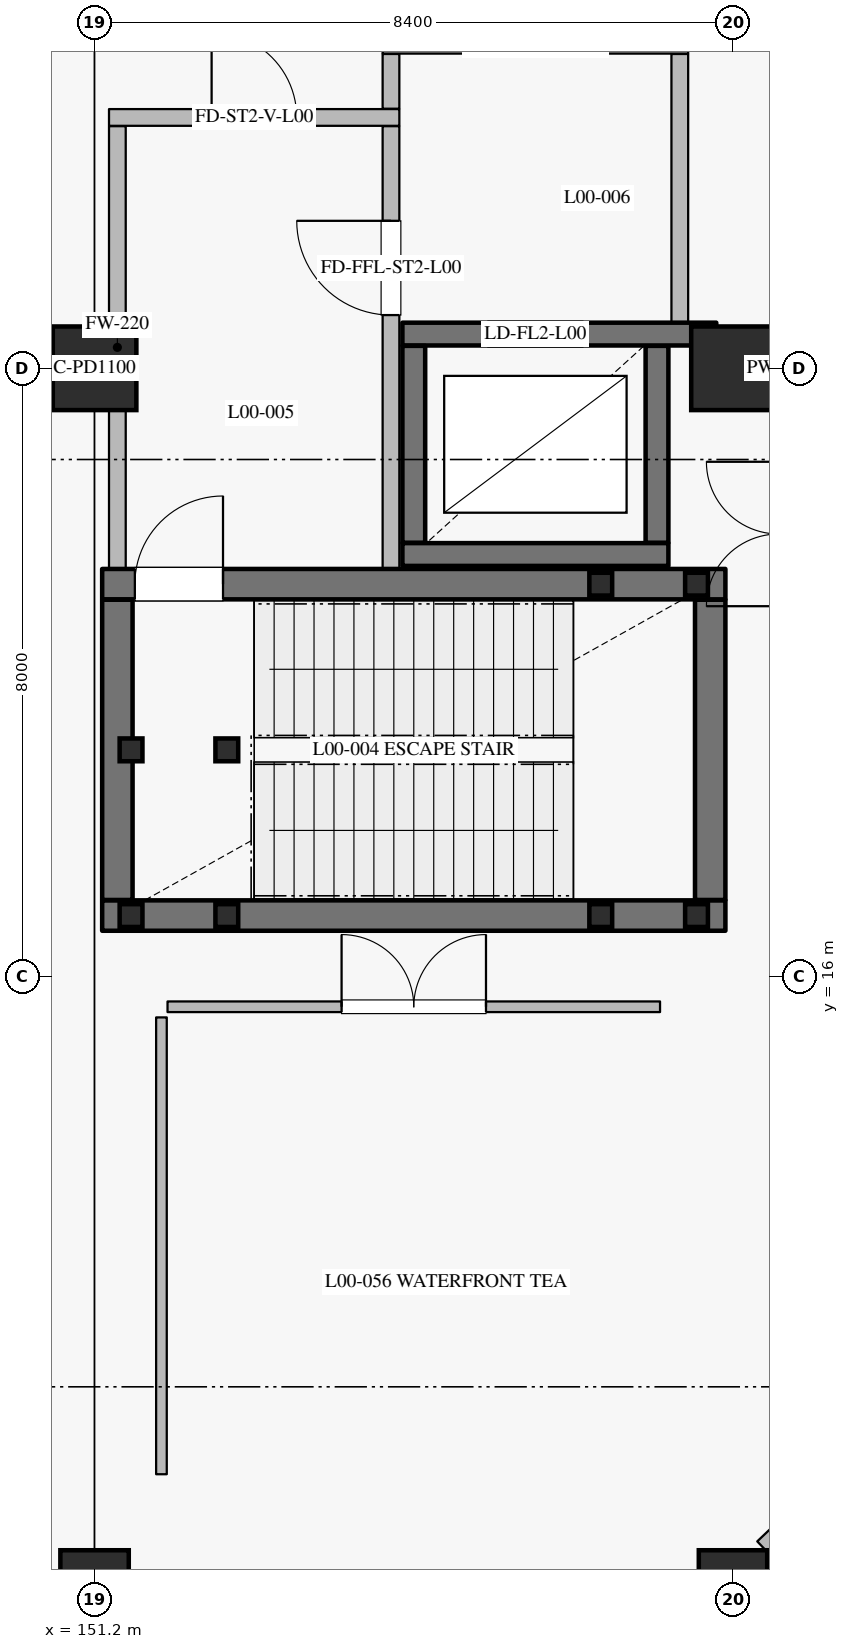
"""IFC4 building model, lengths in metres.
Left out: names, types, materials, properties, quantities, classifications, styles, units other than length and angle.
Written with IfcOpenShell. Run it as: python <this file> out.ifc"""

import sys

from ifc_helpers import new_model, si_unit, direction, frame, frame_2d, origin, origin_2d, place, context, subcontext, project, spatial, rectangle, hollow_rectangle, circle, extrude, element, fill, save


model = new_model("IFC4")
c1 = context("Model", 3, precision=1e-05, world=origin(), true_north=direction((0.0, 1.0)))
c2 = subcontext(c1, "Body", "Model", "MODEL_VIEW")
j1 = project(units=[si_unit("LENGTHUNIT", "METRE"), si_unit("PLANEANGLEUNIT", "RADIAN")], contexts=[c1])
p1 = place(None, origin())
s1 = spatial("IfcSite", under=j1, at=p1, CompositionType="ELEMENT")
p2 = place(p1, origin())
s2 = spatial("IfcBuilding", under=s1, at=p2, CompositionType="ELEMENT")
p3 = place(p2, origin())
s3 = spatial("IfcBuildingStorey", under=s2, at=p3, CompositionType="ELEMENT", Elevation=0.0)
p4 = place(p3, frame((151.2, 8.0, 0.0), z_axis=(0.0, 0.0, 1.0), x_axis=(1.0, 0.0, 0.0)))
e1 = element("IfcColumn", 1, at=p4, inside=s3, PredefinedType="COLUMN", context=c2, shape_type="SweptSolid", body=[
    extrude(circle(Radius=0.45, at=origin_2d()), origin(), (0.0, 0.0, 1.0), 6.0),
])
p5 = place(p3, frame((151.2, 24.0, 0.0), z_axis=(0.0, 0.0, 1.0), x_axis=(1.0, 0.0, 0.0)))
e2 = element("IfcColumn", 2, at=p5, inside=s3, PredefinedType="COLUMN", context=c2, shape_type="SweptSolid", body=[
    extrude(circle(Radius=0.55, at=origin_2d()), origin(), (0.0, 0.0, 1.0), 6.0),
])
p6 = place(p3, frame((159.6, 8.0, 0.0), z_axis=(0.0, 0.0, 1.0), x_axis=(1.0, 0.0, 0.0)))
e3 = element("IfcColumn", 3, at=p6, inside=s3, PredefinedType="COLUMN", context=c2, shape_type="SweptSolid", body=[
    extrude(circle(Radius=0.45, at=origin_2d()), origin(), (0.0, 0.0, 1.0), 6.0),
])
p7 = place(p3, frame((159.6, 24.0, 0.0), z_axis=(0.0, 0.0, 1.0), x_axis=(1.0, 0.0, 0.0)))
e4 = element("IfcColumn", 4, at=p7, inside=s3, PredefinedType="COLUMN", context=c2, shape_type="SweptSolid", body=[
    extrude(circle(Radius=0.55, at=origin_2d()), origin(), (0.0, 0.0, 1.0), 6.0),
])
p8 = place(p3, frame((167.55, 15.571, 0.0), z_axis=(0.0, 0.0, 1.0), x_axis=(-0.724174929863, -0.689616321557, 0.0)))
e5 = element("IfcWall", 5, at=p8, inside=s3, PredefinedType="SOLIDWALL", context=c2, shape_type="SweptSolid", body=[
    extrude(rectangle(XDim=10.357, YDim=0.38, at=frame_2d((5.178, 0.0))), origin(), (0.0, 0.0, 1.0), 5.0),
])
p9 = place(p8, frame((3.978, 0.0, 0.0)))
e6 = element("IfcOpeningElement", 6, at=p9, cuts=e5, PredefinedType="OPENING", context=c2, shape_type="SweptSolid", body=[
    extrude(rectangle(XDim=2.4, YDim=2.6, at=frame_2d((1.2, 1.3))), frame((0.0, 0.2, 0.0), z_axis=(0.0, -1.0, 0.0), x_axis=(1.0, 0.0, 0.0)), (0.0, 0.0, 1.0), 0.4),
])
p10 = place(p3, frame((155.25, 21.55, 0.0), z_axis=(0.0, 0.0, 1.0), x_axis=(1.0, 0.0, 0.0)))
e7 = element("IfcWall", 7, at=p10, inside=s3, PredefinedType="SHEAR", context=c2, shape_type="SweptSolid", body=[
    extrude(rectangle(XDim=3.5, YDim=0.3, at=frame_2d((1.75, 0.0))), origin(), (0.0, 0.0, 1.0), 5.675),
])
p11 = place(p3, frame((158.6, 21.705, 0.0), z_axis=(0.0, 0.0, 1.0), x_axis=(0.0, 1.0, 0.0)))
e8 = element("IfcWall", 8, at=p11, inside=s3, PredefinedType="SHEAR", context=c2, shape_type="SweptSolid", body=[
    extrude(rectangle(XDim=2.59, YDim=0.3, at=frame_2d((1.295, 0.0))), origin(), (0.0, 0.0, 1.0), 5.675),
])
p12 = place(p3, frame((159.38, 24.45, 0.0), z_axis=(0.0, 0.0, 1.0), x_axis=(-1.0, 0.0, 0.0)))
e9 = element("IfcWall", 9, at=p12, inside=s3, PredefinedType="SHEAR", context=c2, shape_type="SweptSolid", body=[
    extrude(rectangle(XDim=4.13, YDim=0.3, at=frame_2d((2.065, 0.0))), origin(), (0.0, 0.0, 1.0), 5.675),
])
p13 = place(p12, frame((1.755, 0.0, 0.0)))
e10 = element("IfcOpeningElement", 10, at=p13, cuts=e9, PredefinedType="OPENING", context=c2, shape_type="SweptSolid", body=[
    extrude(rectangle(XDim=1.25, YDim=2.25, at=frame_2d((0.625, 1.125))), frame((0.0, 0.16, 0.0), z_axis=(0.0, -1.0, 0.0), x_axis=(1.0, 0.0, 0.0)), (0.0, 0.0, 1.0), 0.32),
])
p14 = place(p3, frame((155.4, 24.295, 0.0), z_axis=(0.0, 0.0, 1.0), x_axis=(0.0, -1.0, 0.0)))
e11 = element("IfcWall", 11, at=p14, inside=s3, PredefinedType="SHEAR", context=c2, shape_type="SweptSolid", body=[
    extrude(rectangle(XDim=2.59, YDim=0.3, at=frame_2d((1.295, 0.0))), origin(), (0.0, 0.0, 1.0), 5.675),
])
p15 = place(p3, frame((151.3, 16.8, 0.0), z_axis=(0.0, 0.0, 1.0), x_axis=(1.0, 0.0, 0.0)))
e12 = element("IfcWall", 12, at=p15, inside=s3, PredefinedType="SHEAR", context=c2, shape_type="SweptSolid", body=[
    extrude(rectangle(XDim=8.2, YDim=0.4, at=frame_2d((4.1, 0.0))), origin(), (0.0, 0.0, 1.0), 5.675),
])
p16 = place(p3, frame((159.3, 17.005, 0.0), z_axis=(0.0, 0.0, 1.0), x_axis=(0.0, 1.0, 0.0)))
e13 = element("IfcWall", 13, at=p16, inside=s3, PredefinedType="SHEAR", context=c2, shape_type="SweptSolid", body=[
    extrude(rectangle(XDim=3.95, YDim=0.4, at=frame_2d((1.975, 0.0))), origin(), (0.0, 0.0, 1.0), 5.675),
])
p17 = place(p3, frame((151.3, 21.16, 0.0), z_axis=(0.0, 0.0, 1.0), x_axis=(1.0, 0.0, 0.0)))
e14 = element("IfcWall", 14, at=p17, inside=s3, PredefinedType="SHEAR", context=c2, shape_type="SweptSolid", body=[
    extrude(rectangle(XDim=8.2, YDim=0.4, at=frame_2d((4.1, 0.0))), origin(), (0.0, 0.0, 1.0), 5.675),
])
p18 = place(p17, frame((0.43, 0.0, 0.0)))
e15 = element("IfcOpeningElement", 15, at=p18, cuts=e14, PredefinedType="OPENING", context=c2, shape_type="SweptSolid", body=[
    extrude(rectangle(XDim=1.16, YDim=2.2, at=frame_2d((0.58, 1.1))), frame((0.0, 0.21, 0.0), z_axis=(0.0, -1.0, 0.0), x_axis=(1.0, 0.0, 0.0)), (0.0, 0.0, 1.0), 0.42),
])
p19 = place(p3, frame((151.5, 17.005, 0.0), z_axis=(0.0, 0.0, 1.0), x_axis=(0.0, 1.0, 0.0)))
e16 = element("IfcWall", 16, at=p19, inside=s3, PredefinedType="SHEAR", context=c2, shape_type="SweptSolid", body=[
    extrude(rectangle(XDim=3.95, YDim=0.4, at=frame_2d((1.975, 0.0))), origin(), (0.0, 0.0, 1.0), 5.675),
])
p20 = place(p3, frame((151.5, 21.365, 0.0), z_axis=(0.0, 0.0, 1.0), x_axis=(0.0, 1.0, 0.0)))
e17 = element("IfcWall", 17, at=p20, inside=s3, PredefinedType="PARTITIONING", context=c2, shape_type="SweptSolid", body=[
    extrude(rectangle(XDim=5.82, YDim=0.22, at=frame_2d((2.91, 0.0))), origin(), (0.0, 0.0, 1.0), 4.75),
])
p21 = place(p3, frame((151.39, 27.3, 0.0), z_axis=(0.0, 0.0, 1.0), x_axis=(1.0, 0.0, 0.0)))
e18 = element("IfcWall", 18, at=p21, inside=s3, PredefinedType="PARTITIONING", context=c2, shape_type="SweptSolid", body=[
    extrude(rectangle(XDim=3.82, YDim=0.22, at=frame_2d((1.91, 0.0))), origin(), (0.0, 0.0, 1.0), 5.675),
])
p22 = place(p21, frame((1.35, 0.0, 0.0)))
e19 = element("IfcOpeningElement", 19, at=p22, cuts=e18, PredefinedType="OPENING", context=c2, shape_type="SweptSolid", body=[
    extrude(rectangle(XDim=1.12, YDim=2.2, at=frame_2d((0.56, 1.1))), frame((0.0, 0.12, 0.0), z_axis=(0.0, -1.0, 0.0), x_axis=(1.0, 0.0, 0.0)), (0.0, 0.0, 1.0), 0.24),
])
p23 = place(p3, frame((155.1, 21.365, 0.0), z_axis=(0.0, 0.0, 1.0), x_axis=(0.0, 1.0, 0.0)))
e20 = element("IfcWall", 20, at=p23, inside=s3, PredefinedType="PARTITIONING", context=c2, shape_type="SweptSolid", body=[
    extrude(rectangle(XDim=5.82, YDim=0.22, at=frame_2d((2.91, 0.0))), origin(), (0.0, 0.0, 1.0), 5.675),
])
p24 = place(p23, frame((3.335, 0.0, 0.0)))
e21 = element("IfcOpeningElement", 21, at=p24, cuts=e20, PredefinedType="OPENING", context=c2, shape_type="SweptSolid", body=[
    extrude(rectangle(XDim=1.24, YDim=2.2, at=frame_2d((0.62, 1.1))), frame((0.0, 0.12, 0.0), z_axis=(0.0, -1.0, 0.0), x_axis=(1.0, 0.0, 0.0)), (0.0, 0.0, 1.0), 0.24),
])
p25 = place(p3, frame((155.1, 27.415, 0.0), z_axis=(0.0, 0.0, 1.0), x_axis=(0.0, 1.0, 0.0)))
e22 = element("IfcWall", 22, at=p25, inside=s3, PredefinedType="PARTITIONING", context=c2, shape_type="SweptSolid", body=[
    extrude(rectangle(XDim=0.72, YDim=0.22, at=frame_2d((0.36, 0.0))), origin(), (0.0, 0.0, 1.0), 5.675),
])
p26 = place(p3, frame((158.9, 24.605, 0.0), z_axis=(0.0, 0.0, 1.0), x_axis=(0.0, 1.0, 0.0)))
e23 = element("IfcWall", 23, at=p26, inside=s3, PredefinedType="PARTITIONING", context=c2, shape_type="SweptSolid", body=[
    extrude(rectangle(XDim=3.53, YDim=0.22, at=frame_2d((1.765, 0.0))), origin(), (0.0, 0.0, 1.0), 5.675),
])
p27 = place(p3, frame((154.99, 28.25, 0.0), z_axis=(0.0, 0.0, 1.0), x_axis=(1.0, 0.0, 0.0)))
e24 = element("IfcWall", 24, at=p27, inside=s3, PredefinedType="PARTITIONING", context=c2, shape_type="SweptSolid", body=[
    extrude(rectangle(XDim=4.02, YDim=0.22, at=frame_2d((2.01, 0.0))), origin(), (0.0, 0.0, 1.0), 5.675),
])
p28 = place(p27, frame((1.39, 0.0, 0.0)))
e25 = element("IfcOpeningElement", 25, at=p28, cuts=e24, PredefinedType="OPENING", context=c2, shape_type="SweptSolid", body=[
    extrude(rectangle(XDim=1.24, YDim=2.2, at=frame_2d((0.62, 1.1))), frame((0.0, 0.12, 0.0), z_axis=(0.0, -1.0, 0.0), x_axis=(1.0, 0.0, 0.0)), (0.0, 0.0, 1.0), 0.24),
])
for number, where, z_axis, x_axis in (
    (26, (151.68, 16.8, 0.0), (0.0, 0.0, 1.0), (1.0, 0.0, 0.0)),
    (27, (151.68, 18.98, 0.0), (0.0, 0.0, 1.0), (1.0, 0.0, 0.0)),
    (28, (152.94, 16.8, 0.0), (0.0, 0.0, 1.0), (1.0, 0.0, 0.0)),
    (29, (152.94, 18.98, 0.0), (0.0, 0.0, 1.0), (1.0, 0.0, 0.0)),
):
    element("IfcColumn", number, at=place(p3, frame(where, z_axis=z_axis, x_axis=x_axis)), inside=s3, PredefinedType="COLUMN", context=c2, shape_type="SweptSolid", body=[
        extrude(hollow_rectangle(XDim=0.3, YDim=0.3, WallThickness=0.012, at=origin_2d()), origin(), (0.0, 0.0, 1.0), 5.82),
    ])
for number, where, z_axis, x_axis in (
    (30, (157.86, 16.8, -2.7), (0.0, 0.0, 1.0), (1.0, 0.0, 0.0)),
    (31, (157.86, 21.16, -2.7), (0.0, 0.0, 1.0), (1.0, 0.0, 0.0)),
    (32, (159.12, 16.8, -2.7), (0.0, 0.0, 1.0), (1.0, 0.0, 0.0)),
    (33, (159.12, 21.16, -2.7), (0.0, 0.0, 1.0), (1.0, 0.0, 0.0)),
):
    element("IfcColumn", number, at=place(p3, frame(where, z_axis=z_axis, x_axis=x_axis)), inside=s3, PredefinedType="COLUMN", context=c2, shape_type="SweptSolid", body=[
        extrude(hollow_rectangle(XDim=0.3, YDim=0.3, WallThickness=0.012, at=origin_2d()), origin(), (0.0, 0.0, 1.0), 5.52),
    ])
p29 = place(p3, frame((152.16, 15.6, 0.0), z_axis=(0.0, 0.0, 1.0), x_axis=(1.0, 0.0, 0.0)))
e34 = element("IfcWall", 34, at=p29, inside=s3, PredefinedType="PARTITIONING", context=c2, shape_type="SweptSolid", body=[
    extrude(rectangle(XDim=6.48, YDim=0.14, at=frame_2d((3.24, 0.0))), origin(), (0.0, 0.0, 1.0), 5.675),
])
p30 = place(p29, frame((2.29, 0.0, 0.0)))
e35 = element("IfcOpeningElement", 35, at=p30, cuts=e34, PredefinedType="OPENING", context=c2, shape_type="SweptSolid", body=[
    extrude(rectangle(XDim=1.9, YDim=2.4, at=frame_2d((0.95, 1.2))), frame((0.0, 0.08, 0.0), z_axis=(0.0, -1.0, 0.0), x_axis=(1.0, 0.0, 0.0)), (0.0, 0.0, 1.0), 0.16),
])
p31 = place(p3, frame((152.08, 9.45, 0.0), z_axis=(0.0, 0.0, 1.0), x_axis=(0.0, 1.0, 0.0)))
e36 = element("IfcWall", 36, at=p31, inside=s3, PredefinedType="PARTITIONING", context=c2, shape_type="SweptSolid", body=[
    extrude(rectangle(XDim=6.01, YDim=0.14, at=frame_2d((3.005, 0.0))), origin(), (0.0, 0.0, 1.0), 5.675),
])
p32 = place(p13, origin())
e37 = element("IfcDoor", 37, at=p32, inside=s3, OperationType="DOUBLE_DOOR_SLIDING", PredefinedType="DOOR", context=c2, shape_type="SweptSolid", body=[
    extrude(rectangle(XDim=1.25, YDim=2.25, at=frame_2d((0.625, 1.125))), frame((0.0, 0.025, 0.0), z_axis=(0.0, -1.0, 0.0), x_axis=(1.0, 0.0, 0.0)), (0.0, 0.0, 1.0), 0.05),
])
fill(e10, e37)
p33 = place(p18, origin())
e38 = element("IfcDoor", 38, at=p33, inside=s3, OperationType="SINGLE_SWING_RIGHT", PredefinedType="DOOR", context=c2, shape_type="SweptSolid", body=[
    extrude(rectangle(XDim=1.16, YDim=2.2, at=frame_2d((0.58, 1.1))), frame((0.0, 0.025, 0.0), z_axis=(0.0, -1.0, 0.0), x_axis=(1.0, 0.0, 0.0)), (0.0, 0.0, 1.0), 0.05),
])
fill(e15, e38)
p34 = place(p22, origin())
e39 = element("IfcDoor", 39, at=p34, inside=s3, OperationType="SINGLE_SWING_LEFT", PredefinedType="DOOR", context=c2, shape_type="SweptSolid", body=[
    extrude(rectangle(XDim=1.12, YDim=2.2, at=frame_2d((0.56, 1.1))), frame((0.0, 0.025, 0.0), z_axis=(0.0, -1.0, 0.0), x_axis=(1.0, 0.0, 0.0)), (0.0, 0.0, 1.0), 0.05),
])
fill(e19, e39)
p35 = place(p24, origin())
e40 = element("IfcDoor", 40, at=p35, inside=s3, OperationType="SINGLE_SWING_RIGHT", PredefinedType="DOOR", context=c2, shape_type="SweptSolid", body=[
    extrude(rectangle(XDim=1.24, YDim=2.2, at=frame_2d((0.62, 1.1))), frame((0.0, 0.025, 0.0), z_axis=(0.0, -1.0, 0.0), x_axis=(1.0, 0.0, 0.0)), (0.0, 0.0, 1.0), 0.05),
])
fill(e21, e40)
p36 = place(p30, origin())
e41 = element("IfcDoor", 41, at=p36, inside=s3, OperationType="DOUBLE_DOOR_SINGLE_SWING", PredefinedType="DOOR", context=c2, shape_type="SweptSolid", body=[
    extrude(rectangle(XDim=1.9, YDim=2.4, at=frame_2d((0.95, 1.2))), frame((0.0, 0.025, 0.0), z_axis=(0.0, -1.0, 0.0), x_axis=(1.0, 0.0, 0.0)), (0.0, 0.0, 1.0), 0.05),
])
fill(e35, e41)
save(model, sys.argv[1])
